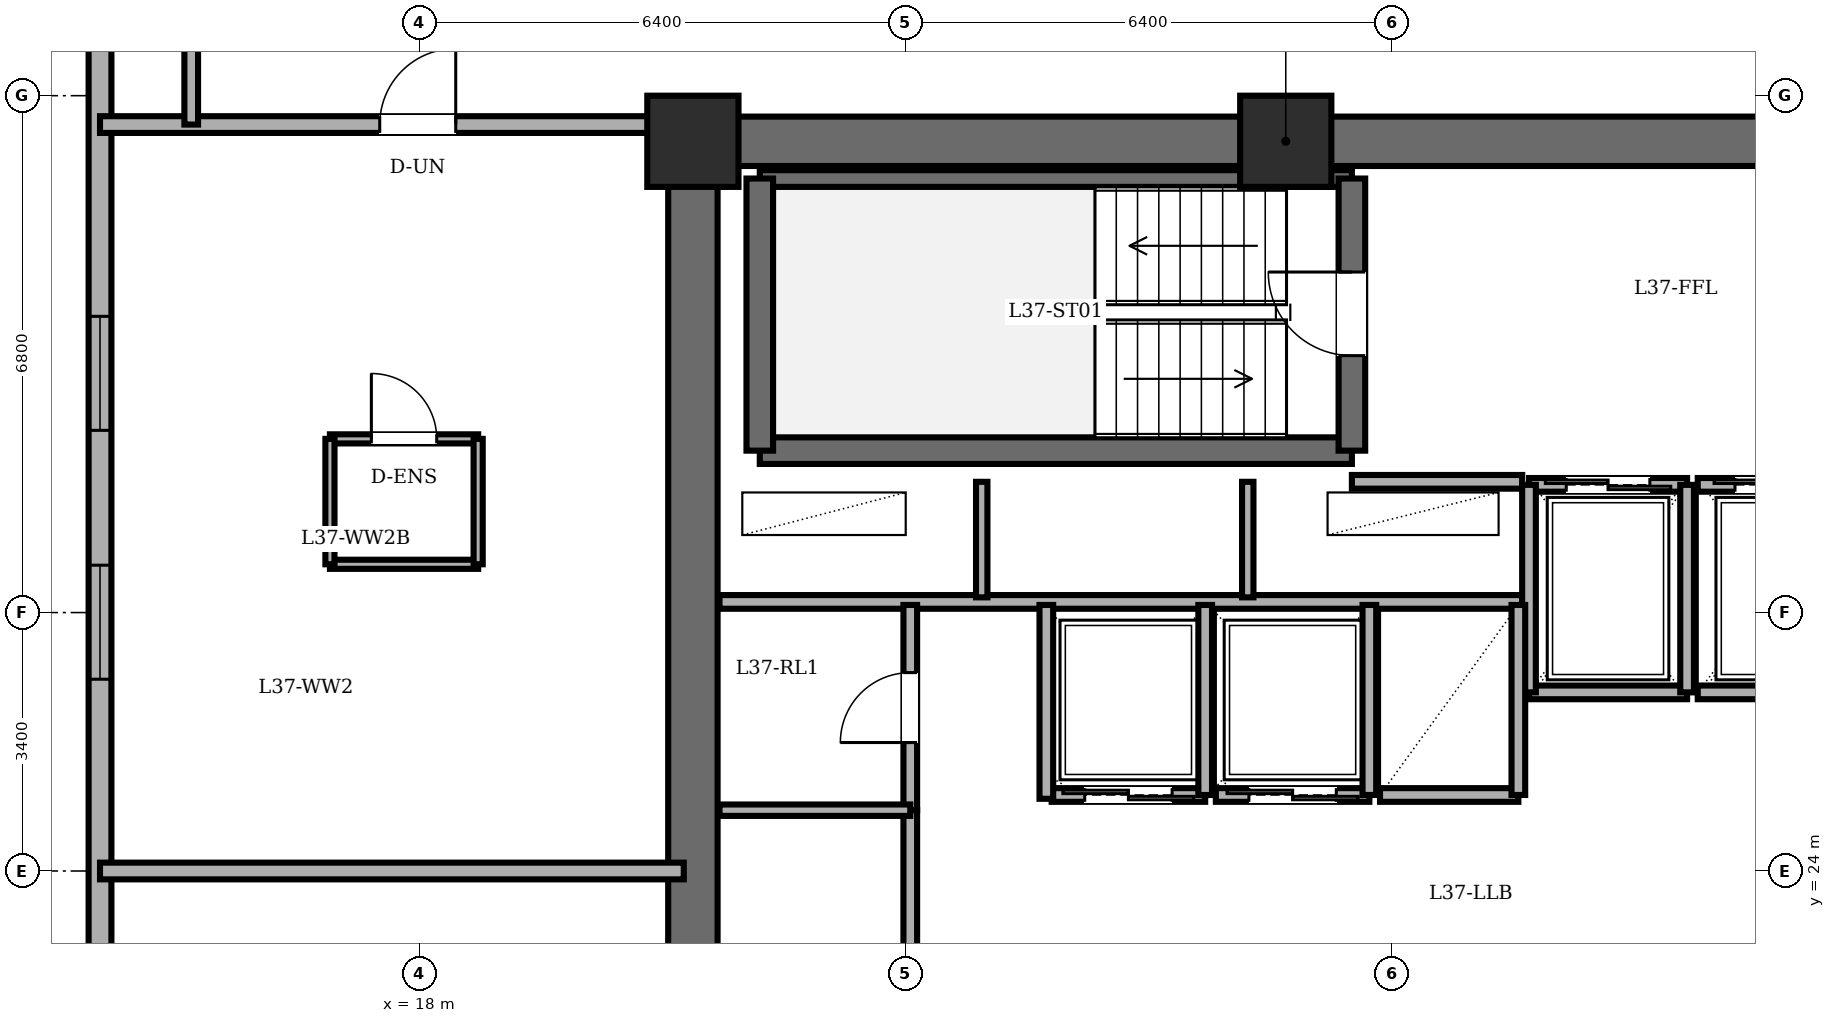
"""IFC4 building model, lengths in metres.
Left out: names, types, materials, properties, quantities, classifications, styles, units other than length and angle.
Written with IfcOpenShell. Run it as: python <this file> out.ifc"""

import sys

from ifc_helpers import new_model, si_unit, direction, frame, frame_2d, origin, origin_2d, place, context, subcontext, project, spatial, rectangle, extrude, element, fill, save


model = new_model("IFC4")
c1 = context("Model", 3, precision=1e-05, world=origin(), true_north=direction((0.0, 1.0)))
c2 = subcontext(c1, "Body", "Model", "MODEL_VIEW")
j1 = project(units=[si_unit("LENGTHUNIT", "METRE"), si_unit("PLANEANGLEUNIT", "RADIAN")], contexts=[c1])
p1 = place(None, origin())
s1 = spatial("IfcSite", under=j1, at=p1, CompositionType="ELEMENT")
p2 = place(p1, origin())
s2 = spatial("IfcBuilding", under=s1, at=p2, CompositionType="ELEMENT")
p3 = place(p2, frame((0.0, 0.0, 143.8)))
s3 = spatial("IfcBuildingStorey", under=s2, at=p3, CompositionType="ELEMENT", Elevation=143.8)
for number, where, z_axis, x_axis in (
    (1, (29.4, 33.6, 0.0), (0.0, 0.0, 1.0), (1.0, 0.0, 0.0)),
    (2, (21.6, 33.6, 0.0), (0.0, 0.0, 1.0), (1.0, 0.0, 0.0)),
):
    element("IfcColumn", number, at=place(p3, frame(where, z_axis=z_axis, x_axis=x_axis)), inside=s3, PredefinedType="COLUMN", context=c2, shape_type="SweptSolid", body=[
        extrude(rectangle(XDim=1.2, YDim=1.2, at=origin_2d()), origin(), (0.0, 0.0, 1.0), 3.6),
    ])
p4 = place(p3, frame((13.8, 36.3, 0.0), z_axis=(0.0, 0.0, 1.0), x_axis=(0.0, -1.0, 0.0)))
e3 = element("IfcWall", 3, at=p4, inside=s3, PredefinedType="SOLIDWALL", context=c2, shape_type="SweptSolid", body=[
    extrude(rectangle(XDim=24.6, YDim=0.3, at=frame_2d((12.3, 0.0))), origin(), (0.0, 0.0, 1.0), 3.4),
])
p5 = place(p4, frame((5.003, 0.0, 0.85)))
e4 = element("IfcOpeningElement", 4, at=p5, cuts=e3, PredefinedType="OPENING", context=c2, shape_type="SweptSolid", body=[
    extrude(rectangle(XDim=1.5, YDim=1.55, at=frame_2d((0.75, 0.775))), frame((0.0, 0.16, 0.0), z_axis=(0.0, -1.0, 0.0), x_axis=(1.0, 0.0, 0.0)), (0.0, 0.0, 1.0), 0.32),
])
p6 = place(p4, frame((8.277, 0.0, 0.85)))
e5 = element("IfcOpeningElement", 5, at=p6, cuts=e3, PredefinedType="OPENING", context=c2, shape_type="SweptSolid", body=[
    extrude(rectangle(XDim=1.5, YDim=1.55, at=frame_2d((0.75, 0.775))), frame((0.0, 0.16, 0.0), z_axis=(0.0, -1.0, 0.0), x_axis=(1.0, 0.0, 0.0)), (0.0, 0.0, 1.0), 0.32),
])
p7 = place(p4, frame((14.823, 0.0, 0.85)))
e6 = element("IfcOpeningElement", 6, at=p7, cuts=e3, PredefinedType="OPENING", context=c2, shape_type="SweptSolid", body=[
    extrude(rectangle(XDim=1.5, YDim=1.55, at=frame_2d((0.75, 0.775))), frame((0.0, 0.16, 0.0), z_axis=(0.0, -1.0, 0.0), x_axis=(1.0, 0.0, 0.0)), (0.0, 0.0, 1.0), 0.32),
])
p8 = place(p4, frame((18.097, 0.0, 0.85)))
e7 = element("IfcOpeningElement", 7, at=p8, cuts=e3, PredefinedType="OPENING", context=c2, shape_type="SweptSolid", body=[
    extrude(rectangle(XDim=1.5, YDim=1.55, at=frame_2d((0.75, 0.775))), frame((0.0, 0.16, 0.0), z_axis=(0.0, -1.0, 0.0), x_axis=(1.0, 0.0, 0.0)), (0.0, 0.0, 1.0), 0.32),
])
p9 = place(p3, frame((21.6, 14.4, 0.0), z_axis=(0.0, 0.0, 1.0), x_axis=(0.0, 1.0, 0.0)))
e8 = element("IfcWall", 8, at=p9, inside=s3, PredefinedType="SHEAR", context=c2, shape_type="SweptSolid", body=[
    extrude(rectangle(XDim=19.2, YDim=0.65, at=frame_2d((9.6, 0.0))), origin(), (0.0, 0.0, 1.0), 3.4),
])
p10 = place(p3, frame((21.6, 33.6, 0.0), z_axis=(0.0, 0.0, 1.0), x_axis=(1.0, 0.0, 0.0)))
e9 = element("IfcWall", 9, at=p10, inside=s3, PredefinedType="SHEAR", context=c2, shape_type="SweptSolid", body=[
    extrude(rectangle(XDim=15.6, YDim=0.65, at=frame_2d((7.8, 0.0))), origin(), (0.0, 0.0, 1.0), 3.4),
])
p11 = place(p3, frame((22.48, 29.53, 0.0), z_axis=(0.0, 0.0, 1.0), x_axis=(1.0, 0.0, 0.0)))
e10 = element("IfcWall", 10, at=p11, inside=s3, PredefinedType="SOLIDWALL", context=c2, shape_type="SweptSolid", body=[
    extrude(rectangle(XDim=7.79, YDim=0.35, at=frame_2d((3.895, 0.0))), origin(), (0.0, 0.0, 1.0), 3.4),
])
p12 = place(p3, frame((22.48, 33.11, 0.0), z_axis=(0.0, 0.0, 1.0), x_axis=(1.0, 0.0, 0.0)))
e11 = element("IfcWall", 11, at=p12, inside=s3, PredefinedType="PARTITIONING", context=c2, shape_type="SweptSolid", body=[
    extrude(rectangle(XDim=7.79, YDim=0.22, at=frame_2d((3.895, 0.0))), origin(), (0.0, 0.0, 1.0), 3.4),
])
p13 = place(p3, frame((22.48, 29.53, 0.0), z_axis=(0.0, 0.0, 1.0), x_axis=(0.0, 1.0, 0.0)))
e12 = element("IfcWall", 12, at=p13, inside=s3, PredefinedType="SOLIDWALL", context=c2, shape_type="SweptSolid", body=[
    extrude(rectangle(XDim=3.58, YDim=0.35, at=frame_2d((1.79, 0.0))), origin(), (0.0, 0.0, 1.0), 3.4),
])
p14 = place(p3, frame((30.27, 29.53, 0.0), z_axis=(0.0, 0.0, 1.0), x_axis=(0.0, 1.0, 0.0)))
e13 = element("IfcWall", 13, at=p14, inside=s3, PredefinedType="SOLIDWALL", context=c2, shape_type="SweptSolid", body=[
    extrude(rectangle(XDim=3.58, YDim=0.35, at=frame_2d((1.79, 0.0))), origin(), (0.0, 0.0, 1.0), 3.4),
])
p15 = place(p14, frame((1.25, 0.0, 0.0)))
e14 = element("IfcOpeningElement", 14, at=p15, cuts=e13, PredefinedType="OPENING", context=c2, shape_type="SweptSolid", body=[
    extrude(rectangle(XDim=1.1, YDim=2.15, at=frame_2d((0.55, 1.075))), frame((0.0, 0.185, 0.0), z_axis=(0.0, -1.0, 0.0), x_axis=(1.0, 0.0, 0.0)), (0.0, 0.0, 1.0), 0.37),
])
p16 = place(p3, frame((30.27, 29.12, 0.0), z_axis=(0.0, 0.0, 1.0), x_axis=(1.0, 0.0, 0.0)))
e15 = element("IfcWall", 15, at=p16, inside=s3, PredefinedType="PARTITIONING", context=c2, shape_type="SweptSolid", body=[
    extrude(rectangle(XDim=2.24, YDim=0.18, at=frame_2d((1.12, 0.0))), origin(), (0.0, 0.0, 1.0), 3.4),
])
p17 = place(p3, frame((21.95, 27.54, 0.0), z_axis=(0.0, 0.0, 1.0), x_axis=(1.0, 0.0, 0.0)))
e16 = element("IfcWall", 16, at=p17, inside=s3, PredefinedType="PARTITIONING", context=c2, shape_type="SweptSolid", body=[
    extrude(rectangle(XDim=10.56, YDim=0.18, at=frame_2d((5.28, 0.0))), origin(), (0.0, 0.0, 1.0), 3.4),
])
for number, where, z_axis, x_axis in (
    (17, (25.4, 27.6, 0.0), (0.0, 0.0, 1.0), (0.0, 1.0, 0.0)),
    (18, (28.9, 27.6, 0.0), (0.0, 0.0, 1.0), (0.0, 1.0, 0.0)),
):
    element("IfcWall", number, at=place(p3, frame(where, z_axis=z_axis, x_axis=x_axis)), inside=s3, PredefinedType="PARTITIONING", context=c2, shape_type="SweptSolid", body=[
        extrude(rectangle(XDim=1.52, YDim=0.15, at=frame_2d((0.76, 0.0))), origin(), (0.0, 0.0, 1.0), 3.4),
    ])
p18 = place(p3, frame((32.6, 29.08, 0.0), z_axis=(0.0, 0.0, 1.0), x_axis=(1.0, 0.0, 0.0)))
e19 = element("IfcWall", 19, at=p18, inside=s3, PredefinedType="PARTITIONING", context=c2, shape_type="SweptSolid", body=[
    extrude(rectangle(XDim=2.08, YDim=0.18, at=frame_2d((1.04, 0.0))), origin(), (0.0, 0.0, 1.0), 3.4),
])
p19 = place(p18, frame((0.49, 0.0, 0.0)))
e20 = element("IfcOpeningElement", 20, at=p19, cuts=e19, PredefinedType="OPENING", context=c2, shape_type="SweptSolid", body=[
    extrude(rectangle(XDim=1.1, YDim=2.2, at=frame_2d((0.55, 1.1))), frame((0.0, 0.1, 0.0), z_axis=(0.0, -1.0, 0.0), x_axis=(1.0, 0.0, 0.0)), (0.0, 0.0, 1.0), 0.2),
])
p20 = place(p3, frame((34.68, 26.35, 0.0), z_axis=(0.0, 0.0, 1.0), x_axis=(-1.0, 0.0, 0.0)))
e21 = element("IfcWall", 21, at=p20, inside=s3, PredefinedType="PARTITIONING", context=c2, shape_type="SweptSolid", body=[
    extrude(rectangle(XDim=2.08, YDim=0.18, at=frame_2d((1.04, 0.0))), origin(), (0.0, 0.0, 1.0), 3.4),
])
for number, where, z_axis, x_axis in (
    (22, (34.68, 26.35, 0.0), (0.0, 0.0, 1.0), (0.0, 1.0, 0.0)),
    (23, (32.6, 29.08, 0.0), (0.0, 0.0, 1.0), (0.0, -1.0, 0.0)),
):
    element("IfcWall", number, at=place(p3, frame(where, z_axis=z_axis, x_axis=x_axis)), inside=s3, PredefinedType="PARTITIONING", context=c2, shape_type="SweptSolid", body=[
        extrude(rectangle(XDim=2.73, YDim=0.18, at=frame_2d((1.365, 0.0))), origin(), (0.0, 0.0, 1.0), 3.4),
    ])
p21 = place(p3, frame((34.82, 29.08, 0.0), z_axis=(0.0, 0.0, 1.0), x_axis=(1.0, 0.0, 0.0)))
e24 = element("IfcWall", 24, at=p21, inside=s3, PredefinedType="PARTITIONING", context=c2, shape_type="SweptSolid", body=[
    extrude(rectangle(XDim=2.08, YDim=0.18, at=frame_2d((1.04, 0.0))), origin(), (0.0, 0.0, 1.0), 3.4),
])
p22 = place(p21, frame((0.49, 0.0, 0.0)))
e25 = element("IfcOpeningElement", 25, at=p22, cuts=e24, PredefinedType="OPENING", context=c2, shape_type="SweptSolid", body=[
    extrude(rectangle(XDim=1.1, YDim=2.2, at=frame_2d((0.55, 1.1))), frame((0.0, 0.1, 0.0), z_axis=(0.0, -1.0, 0.0), x_axis=(1.0, 0.0, 0.0)), (0.0, 0.0, 1.0), 0.2),
])
p23 = place(p3, frame((36.9, 26.35, 0.0), z_axis=(0.0, 0.0, 1.0), x_axis=(-1.0, 0.0, 0.0)))
e26 = element("IfcWall", 26, at=p23, inside=s3, PredefinedType="PARTITIONING", context=c2, shape_type="SweptSolid", body=[
    extrude(rectangle(XDim=2.08, YDim=0.18, at=frame_2d((1.04, 0.0))), origin(), (0.0, 0.0, 1.0), 3.4),
])
p24 = place(p3, frame((28.34, 25.0, 0.0), z_axis=(0.0, 0.0, 1.0), x_axis=(-1.0, 0.0, 0.0)))
e27 = element("IfcWall", 27, at=p24, inside=s3, PredefinedType="PARTITIONING", context=c2, shape_type="SweptSolid", body=[
    extrude(rectangle(XDim=2.02, YDim=0.18, at=frame_2d((1.01, 0.0))), origin(), (0.0, 0.0, 1.0), 3.4),
])
p25 = place(p24, frame((0.435, 0.0, 0.0)))
e28 = element("IfcOpeningElement", 28, at=p25, cuts=e27, PredefinedType="OPENING", context=c2, shape_type="SweptSolid", body=[
    extrude(rectangle(XDim=1.15, YDim=2.2, at=frame_2d((0.575, 1.1))), frame((0.0, 0.1, 0.0), z_axis=(0.0, -1.0, 0.0), x_axis=(1.0, 0.0, 0.0)), (0.0, 0.0, 1.0), 0.2),
])
p26 = place(p3, frame((28.34, 25.0, 0.0), z_axis=(0.0, 0.0, 1.0), x_axis=(0.0, 1.0, 0.0)))
e29 = element("IfcWall", 29, at=p26, inside=s3, PredefinedType="PARTITIONING", context=c2, shape_type="SweptSolid", body=[
    extrude(rectangle(XDim=2.5, YDim=0.18, at=frame_2d((1.25, 0.0))), origin(), (0.0, 0.0, 1.0), 3.4),
])
p27 = place(p3, frame((30.5, 25.0, 0.0), z_axis=(0.0, 0.0, 1.0), x_axis=(-1.0, 0.0, 0.0)))
e30 = element("IfcWall", 30, at=p27, inside=s3, PredefinedType="PARTITIONING", context=c2, shape_type="SweptSolid", body=[
    extrude(rectangle(XDim=2.02, YDim=0.18, at=frame_2d((1.01, 0.0))), origin(), (0.0, 0.0, 1.0), 3.4),
])
p28 = place(p27, frame((0.435, 0.0, 0.0)))
e31 = element("IfcOpeningElement", 31, at=p28, cuts=e30, PredefinedType="OPENING", context=c2, shape_type="SweptSolid", body=[
    extrude(rectangle(XDim=1.15, YDim=2.2, at=frame_2d((0.575, 1.1))), frame((0.0, 0.1, 0.0), z_axis=(0.0, -1.0, 0.0), x_axis=(1.0, 0.0, 0.0)), (0.0, 0.0, 1.0), 0.2),
])
p29 = place(p3, frame((30.5, 25.0, 0.0), z_axis=(0.0, 0.0, 1.0), x_axis=(0.0, 1.0, 0.0)))
e32 = element("IfcWall", 32, at=p29, inside=s3, PredefinedType="PARTITIONING", context=c2, shape_type="SweptSolid", body=[
    extrude(rectangle(XDim=2.5, YDim=0.18, at=frame_2d((1.25, 0.0))), origin(), (0.0, 0.0, 1.0), 3.4),
])
p30 = place(p3, frame((32.46, 25.0, 0.0), z_axis=(0.0, 0.0, 1.0), x_axis=(-1.0, 0.0, 0.0)))
e33 = element("IfcWall", 33, at=p30, inside=s3, PredefinedType="PARTITIONING", context=c2, shape_type="SweptSolid", body=[
    extrude(rectangle(XDim=1.82, YDim=0.18, at=frame_2d((0.91, 0.0))), origin(), (0.0, 0.0, 1.0), 3.4),
])
p31 = place(p3, frame((32.46, 25.0, 0.0), z_axis=(0.0, 0.0, 1.0), x_axis=(0.0, 1.0, 0.0)))
e34 = element("IfcWall", 34, at=p31, inside=s3, PredefinedType="PARTITIONING", context=c2, shape_type="SweptSolid", body=[
    extrude(rectangle(XDim=2.5, YDim=0.18, at=frame_2d((1.25, 0.0))), origin(), (0.0, 0.0, 1.0), 3.4),
])
p32 = place(p3, frame((24.46, 24.8, 0.0), z_axis=(0.0, 0.0, 1.0), x_axis=(0.0, 1.0, 0.0)))
e35 = element("IfcWall", 35, at=p32, inside=s3, PredefinedType="PARTITIONING", context=c2, shape_type="SweptSolid", body=[
    extrude(rectangle(XDim=2.7, YDim=0.18, at=frame_2d((1.35, 0.0))), origin(), (0.0, 0.0, 1.0), 3.4),
])
p33 = place(p32, frame((0.89, 0.0, 0.0)))
e36 = element("IfcOpeningElement", 36, at=p33, cuts=e35, PredefinedType="OPENING", context=c2, shape_type="SweptSolid", body=[
    extrude(rectangle(XDim=0.92, YDim=2.1, at=frame_2d((0.46, 1.05))), frame((0.0, 0.1, 0.0), z_axis=(0.0, -1.0, 0.0), x_axis=(1.0, 0.0, 0.0)), (0.0, 0.0, 1.0), 0.2),
])
p34 = place(p3, frame((24.46, 19.8, 0.0), z_axis=(0.0, 0.0, 1.0), x_axis=(0.0, 1.0, 0.0)))
e37 = element("IfcWall", 37, at=p34, inside=s3, PredefinedType="PARTITIONING", context=c2, shape_type="SweptSolid", body=[
    extrude(rectangle(XDim=5.0, YDim=0.18, at=frame_2d((2.5, 0.0))), origin(), (0.0, 0.0, 1.0), 3.4),
])
p35 = place(p34, frame((2.04, 0.0, 0.0)))
e38 = element("IfcOpeningElement", 38, at=p35, cuts=e37, PredefinedType="OPENING", context=c2, shape_type="SweptSolid", body=[
    extrude(rectangle(XDim=0.92, YDim=2.1, at=frame_2d((0.46, 1.05))), frame((0.0, 0.1, 0.0), z_axis=(0.0, -1.0, 0.0), x_axis=(1.0, 0.0, 0.0)), (0.0, 0.0, 1.0), 0.2),
])
p36 = place(p3, frame((21.95, 24.8, 0.0), z_axis=(0.0, 0.0, 1.0), x_axis=(1.0, 0.0, 0.0)))
e39 = element("IfcWall", 39, at=p36, inside=s3, PredefinedType="PARTITIONING", context=c2, shape_type="SweptSolid", body=[
    extrude(rectangle(XDim=2.51, YDim=0.15, at=frame_2d((1.255, 0.0))), origin(), (0.0, 0.0, 1.0), 3.4),
])
p37 = place(p3, frame((26.25, 24.95, 0.0), z_axis=(0.0, 0.0, 1.0), x_axis=(0.0, 1.0, 0.0)))
e40 = element("IfcWall", 40, at=p37, inside=s3, PredefinedType="PARTITIONING", context=c2, shape_type="SweptSolid", body=[
    extrude(rectangle(XDim=2.55, YDim=0.18, at=frame_2d((1.275, 0.0))), origin(), (0.0, 0.0, 1.0), 3.4),
])
p38 = place(p3, frame((16.825, 29.685, 0.0), z_axis=(0.0, 0.0, 1.0), x_axis=(1.0, 0.0, 0.0)))
e41 = element("IfcWall", 41, at=p38, inside=s3, PredefinedType="PARTITIONING", context=c2, shape_type="SweptSolid", body=[
    extrude(rectangle(XDim=1.95, YDim=0.12, at=frame_2d((0.975, 0.0))), origin(), (0.0, 0.0, 1.0), 3.4),
])
p39 = place(p38, frame((0.545, 0.0, 0.0)))
e42 = element("IfcOpeningElement", 42, at=p39, cuts=e41, PredefinedType="OPENING", context=c2, shape_type="SweptSolid", body=[
    extrude(rectangle(XDim=0.86, YDim=2.1, at=frame_2d((0.43, 1.05))), frame((0.0, 0.07, 0.0), z_axis=(0.0, -1.0, 0.0), x_axis=(1.0, 0.0, 0.0)), (0.0, 0.0, 1.0), 0.14),
])
p40 = place(p3, frame((18.775, 28.035, 0.0), z_axis=(0.0, 0.0, 1.0), x_axis=(-1.0, 0.0, 0.0)))
e43 = element("IfcWall", 43, at=p40, inside=s3, PredefinedType="PARTITIONING", context=c2, shape_type="SweptSolid", body=[
    extrude(rectangle(XDim=1.95, YDim=0.12, at=frame_2d((0.975, 0.0))), origin(), (0.0, 0.0, 1.0), 3.4),
])
for number, where, z_axis, x_axis in (
    (44, (16.825, 29.685, 0.0), (0.0, 0.0, 1.0), (0.0, -1.0, 0.0)),
    (45, (18.775, 28.035, 0.0), (0.0, 0.0, 1.0), (0.0, 1.0, 0.0)),
):
    element("IfcWall", number, at=place(p3, frame(where, z_axis=z_axis, x_axis=x_axis)), inside=s3, PredefinedType="PARTITIONING", context=c2, shape_type="SweptSolid", body=[
        extrude(rectangle(XDim=1.65, YDim=0.12, at=frame_2d((0.825, 0.0))), origin(), (0.0, 0.0, 1.0), 3.4),
    ])
p41 = place(p3, frame((13.8, 24.0, 0.0), z_axis=(0.0, 0.0, 1.0), x_axis=(1.0, 0.0, 0.0)))
e46 = element("IfcWall", 46, at=p41, inside=s3, PredefinedType="PARTITIONING", context=c2, shape_type="SweptSolid", body=[
    extrude(rectangle(XDim=7.68, YDim=0.22, at=frame_2d((3.84, 0.0))), origin(), (0.0, 0.0, 1.0), 3.4),
])
p42 = place(p3, frame((13.8, 33.82, 0.0), z_axis=(0.0, 0.0, 1.0), x_axis=(1.0, 0.0, 0.0)))
e47 = element("IfcWall", 47, at=p42, inside=s3, PredefinedType="PARTITIONING", context=c2, shape_type="SweptSolid", body=[
    extrude(rectangle(XDim=7.68, YDim=0.22, at=frame_2d((3.84, 0.0))), origin(), (0.0, 0.0, 1.0), 3.4),
])
p43 = place(p42, frame((3.68, 0.0, 0.0)))
e48 = element("IfcOpeningElement", 48, at=p43, cuts=e47, PredefinedType="OPENING", context=c2, shape_type="SweptSolid", body=[
    extrude(rectangle(XDim=1.0, YDim=2.15, at=frame_2d((0.5, 1.075))), frame((0.0, 0.12, 0.0), z_axis=(0.0, -1.0, 0.0), x_axis=(1.0, 0.0, 0.0)), (0.0, 0.0, 1.0), 0.24),
])
p44 = place(p3, frame((15.0, 33.82, 0.0), z_axis=(0.0, 0.0, 1.0), x_axis=(0.0, 1.0, 0.0)))
e49 = element("IfcWall", 49, at=p44, inside=s3, PredefinedType="PARTITIONING", context=c2, shape_type="SweptSolid", body=[
    extrude(rectangle(XDim=5.693, YDim=0.18, at=frame_2d((2.846, 0.0))), origin(), (0.0, 0.0, 1.0), 3.4),
])
p45 = place(p5, origin())
e50 = element("IfcWindow", 50, at=p45, inside=s3, PartitioningType="DOUBLE_PANEL_VERTICAL", PredefinedType="WINDOW", context=c2, shape_type="SweptSolid", body=[
    extrude(rectangle(XDim=1.5, YDim=1.55, at=frame_2d((0.75, 0.775))), frame((0.0, 0.03, 0.0), z_axis=(0.0, -1.0, 0.0), x_axis=(1.0, 0.0, 0.0)), (0.0, 0.0, 1.0), 0.06),
])
fill(e4, e50)
p46 = place(p6, origin())
e51 = element("IfcWindow", 51, at=p46, inside=s3, PartitioningType="DOUBLE_PANEL_VERTICAL", PredefinedType="WINDOW", context=c2, shape_type="SweptSolid", body=[
    extrude(rectangle(XDim=1.5, YDim=1.55, at=frame_2d((0.75, 0.775))), frame((0.0, 0.03, 0.0), z_axis=(0.0, -1.0, 0.0), x_axis=(1.0, 0.0, 0.0)), (0.0, 0.0, 1.0), 0.06),
])
fill(e5, e51)
p47 = place(p15, origin())
e52 = element("IfcDoor", 52, at=p47, inside=s3, OperationType="SINGLE_SWING_RIGHT", PredefinedType="DOOR", context=c2, shape_type="SweptSolid", body=[
    extrude(rectangle(XDim=1.1, YDim=2.15, at=frame_2d((0.55, 1.075))), frame((0.0, 0.025, 0.0), z_axis=(0.0, -1.0, 0.0), x_axis=(1.0, 0.0, 0.0)), (0.0, 0.0, 1.0), 0.05),
])
fill(e14, e52)
p48 = place(p19, origin())
e53 = element("IfcDoor", 53, at=p48, inside=s3, OperationType="DOUBLE_DOOR_SLIDING", PredefinedType="DOOR", context=c2, shape_type="SweptSolid", body=[
    extrude(rectangle(XDim=1.1, YDim=2.2, at=frame_2d((0.55, 1.1))), frame((0.0, 0.025, 0.0), z_axis=(0.0, -1.0, 0.0), x_axis=(1.0, 0.0, 0.0)), (0.0, 0.0, 1.0), 0.05),
])
fill(e20, e53)
p49 = place(p22, origin())
e54 = element("IfcDoor", 54, at=p49, inside=s3, OperationType="DOUBLE_DOOR_SLIDING", PredefinedType="DOOR", context=c2, shape_type="SweptSolid", body=[
    extrude(rectangle(XDim=1.1, YDim=2.2, at=frame_2d((0.55, 1.1))), frame((0.0, 0.025, 0.0), z_axis=(0.0, -1.0, 0.0), x_axis=(1.0, 0.0, 0.0)), (0.0, 0.0, 1.0), 0.05),
])
fill(e25, e54)
p50 = place(p25, origin())
e55 = element("IfcDoor", 55, at=p50, inside=s3, OperationType="DOUBLE_DOOR_SLIDING", PredefinedType="DOOR", context=c2, shape_type="SweptSolid", body=[
    extrude(rectangle(XDim=1.15, YDim=2.2, at=frame_2d((0.575, 1.1))), frame((0.0, 0.025, 0.0), z_axis=(0.0, -1.0, 0.0), x_axis=(1.0, 0.0, 0.0)), (0.0, 0.0, 1.0), 0.05),
])
fill(e28, e55)
p51 = place(p28, origin())
e56 = element("IfcDoor", 56, at=p51, inside=s3, OperationType="DOUBLE_DOOR_SLIDING", PredefinedType="DOOR", context=c2, shape_type="SweptSolid", body=[
    extrude(rectangle(XDim=1.15, YDim=2.2, at=frame_2d((0.575, 1.1))), frame((0.0, 0.025, 0.0), z_axis=(0.0, -1.0, 0.0), x_axis=(1.0, 0.0, 0.0)), (0.0, 0.0, 1.0), 0.05),
])
fill(e31, e56)
p52 = place(p33, origin())
e57 = element("IfcDoor", 57, at=p52, inside=s3, OperationType="SINGLE_SWING_LEFT", PredefinedType="DOOR", context=c2, shape_type="SweptSolid", body=[
    extrude(rectangle(XDim=0.92, YDim=2.1, at=frame_2d((0.46, 1.05))), frame((0.0, 0.025, 0.0), z_axis=(0.0, -1.0, 0.0), x_axis=(1.0, 0.0, 0.0)), (0.0, 0.0, 1.0), 0.05),
])
fill(e36, e57)
p53 = place(p39, origin())
e58 = element("IfcDoor", 58, at=p53, inside=s3, OperationType="SINGLE_SWING_LEFT", PredefinedType="DOOR", context=c2, shape_type="SweptSolid", body=[
    extrude(rectangle(XDim=0.86, YDim=2.1, at=frame_2d((0.43, 1.05))), frame((0.0, 0.025, 0.0), z_axis=(0.0, -1.0, 0.0), x_axis=(1.0, 0.0, 0.0)), (0.0, 0.0, 1.0), 0.05),
])
fill(e42, e58)
p54 = place(p43, origin())
e59 = element("IfcDoor", 59, at=p54, inside=s3, OperationType="SINGLE_SWING_RIGHT", PredefinedType="DOOR", context=c2, shape_type="SweptSolid", body=[
    extrude(rectangle(XDim=1.0, YDim=2.15, at=frame_2d((0.5, 1.075))), frame((0.0, 0.025, 0.0), z_axis=(0.0, -1.0, 0.0), x_axis=(1.0, 0.0, 0.0)), (0.0, 0.0, 1.0), 0.05),
])
fill(e48, e59)
save(model, sys.argv[1])
